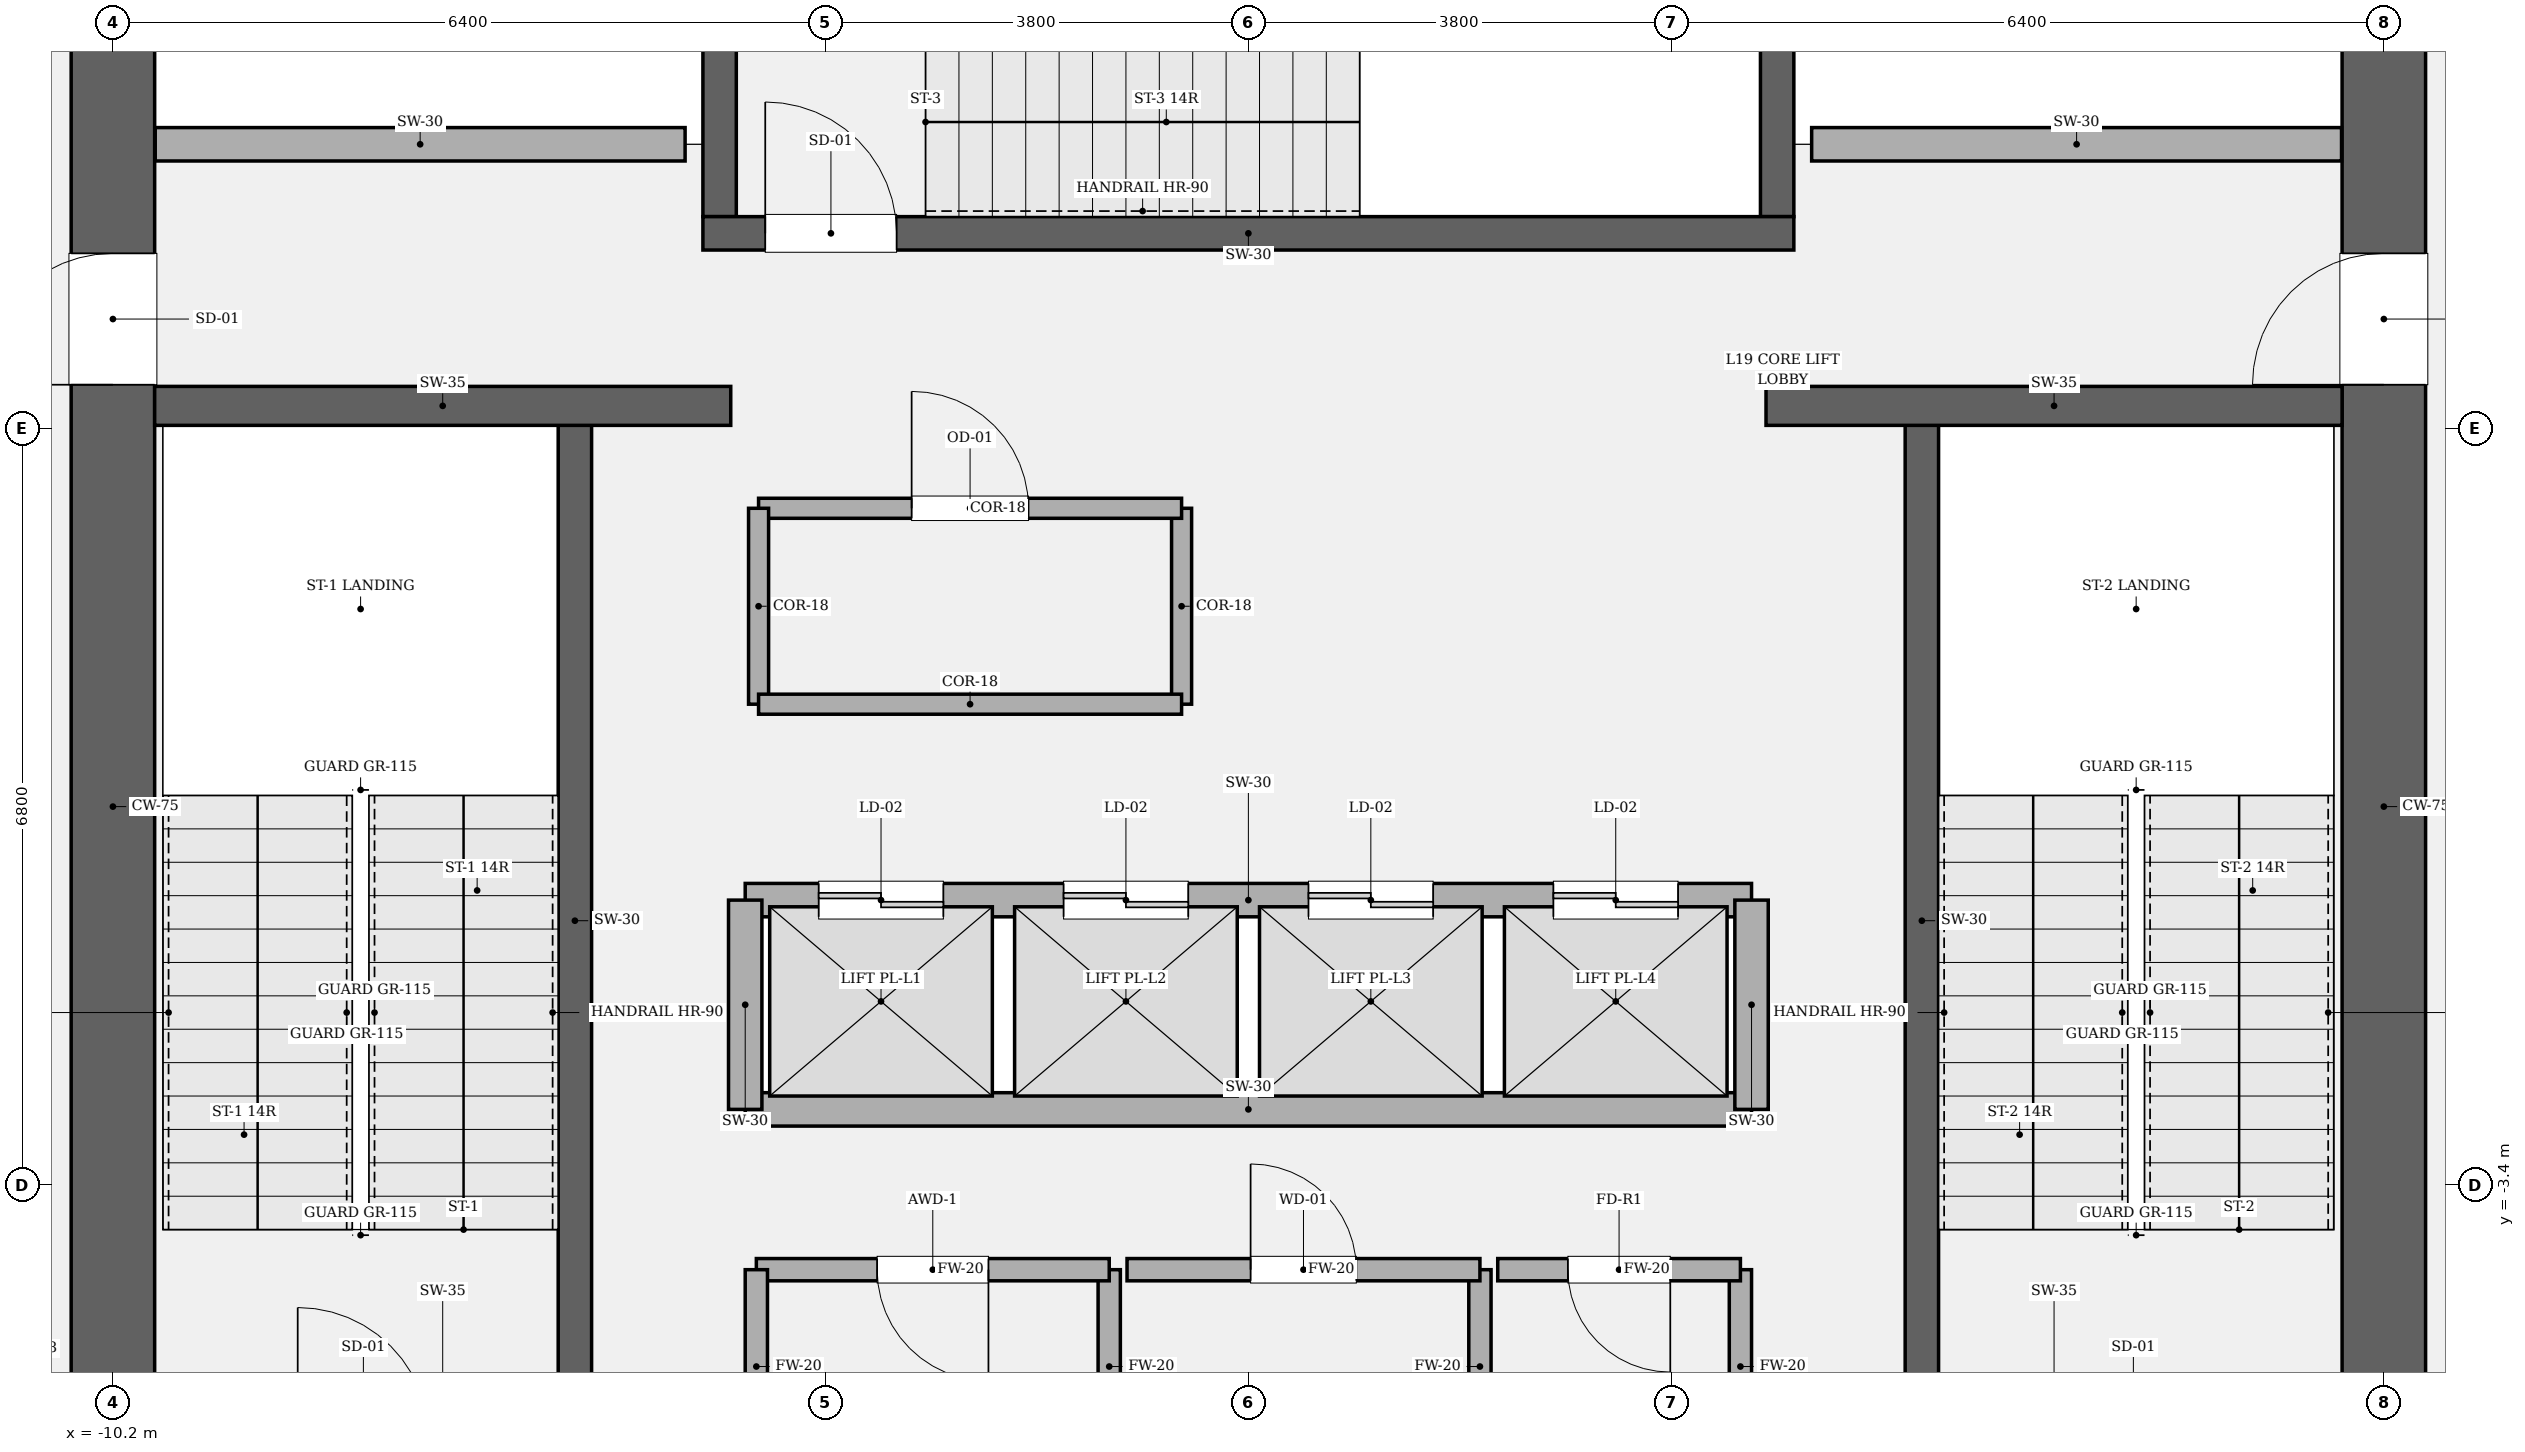
"""IFC4 building model, lengths in metres.
Left out: names, types, materials, properties, quantities, classifications, styles, units other than length and angle.
Written with IfcOpenShell. Run it as: python <this file> out.ifc"""

import sys

from ifc_helpers import new_model, si_unit, direction, frame, frame_2d, origin, place, context, subcontext, project, spatial, rectangle, extrude, element, fill, save


model = new_model("IFC4")
c1 = context("Model", 3, precision=1e-05, world=origin(), true_north=direction((0.0, 1.0)))
c2 = subcontext(c1, "Body", "Model", "MODEL_VIEW")
j1 = project(units=[si_unit("LENGTHUNIT", "METRE"), si_unit("PLANEANGLEUNIT", "RADIAN")], contexts=[c1])
p1 = place(None, origin())
s1 = spatial("IfcSite", under=j1, at=p1, CompositionType="ELEMENT")
p2 = place(p1, origin())
s2 = spatial("IfcBuilding", under=s1, at=p2, CompositionType="ELEMENT")
p3 = place(p2, frame((0.0, 0.0, 84.9)))
s3 = spatial("IfcBuildingStorey", under=s2, at=p3, CompositionType="ELEMENT", Elevation=84.9)
p4 = place(p3, frame((-10.2, -8.825, 0.0), z_axis=(0.0, 0.0, 1.0), x_axis=(0.0, 1.0, 0.0)))
e1 = element("IfcWall", 1, at=p4, inside=s3, PredefinedType="SHEAR", context=c2, shape_type="SweptSolid", body=[
    extrude(rectangle(XDim=17.65, YDim=0.75, at=frame_2d((8.825, 0.0))), origin(), (0.0, 0.0, 1.0), 4.05),
])
p5 = place(p4, frame((12.615, 0.0, 0.0)))
e2 = element("IfcOpeningElement", 2, at=p5, cuts=e1, PredefinedType="OPENING", context=c2, shape_type="SweptSolid", body=[
    extrude(rectangle(XDim=1.18, YDim=2.2, at=frame_2d((0.59, 1.1))), frame((0.0, 0.385, 0.0), z_axis=(0.0, -1.0, 0.0), x_axis=(1.0, 0.0, 0.0)), (0.0, 0.0, 1.0), 0.77),
])
p6 = place(p3, frame((10.2, 8.825, 0.0), z_axis=(0.0, 0.0, 1.0), x_axis=(0.0, -1.0, 0.0)))
e3 = element("IfcWall", 3, at=p6, inside=s3, PredefinedType="SHEAR", context=c2, shape_type="SweptSolid", body=[
    extrude(rectangle(XDim=17.65, YDim=0.75, at=frame_2d((8.825, 0.0))), origin(), (0.0, 0.0, 1.0), 4.05),
])
p7 = place(p6, frame((3.855, 0.0, 0.0)))
e4 = element("IfcOpeningElement", 4, at=p7, cuts=e3, PredefinedType="OPENING", context=c2, shape_type="SweptSolid", body=[
    extrude(rectangle(XDim=1.18, YDim=2.2, at=frame_2d((0.59, 1.1))), frame((0.0, 0.385, 0.0), z_axis=(0.0, -1.0, 0.0), x_axis=(1.0, 0.0, 0.0)), (0.0, 0.0, 1.0), 0.77),
])
for number, where, z_axis, x_axis in (
    (5, (-6.05, -5.5, 0.0), (0.0, 0.0, 1.0), (0.0, 1.0, 0.0)),
    (6, (6.05, 3.45, 0.0), (0.0, 0.0, 1.0), (0.0, -1.0, 0.0)),
):
    element("IfcWall", number, at=place(p3, frame(where, z_axis=z_axis, x_axis=x_axis)), inside=s3, PredefinedType="SOLIDWALL", context=c2, shape_type="SweptSolid", body=[
        extrude(rectangle(XDim=8.95, YDim=0.3, at=frame_2d((4.475, 0.0))), origin(), (0.0, 0.0, 1.0), 4.05),
    ])
for number, where, z_axis, x_axis in (
    (7, (-4.75, 5.3, 0.0), (0.0, 0.0, 1.0), (0.0, 1.0, 0.0)),
    (8, (4.75, 8.825, 0.0), (0.0, 0.0, 1.0), (0.0, -1.0, 0.0)),
):
    element("IfcWall", number, at=place(p3, frame(where, z_axis=z_axis, x_axis=x_axis)), inside=s3, PredefinedType="SOLIDWALL", context=c2, shape_type="SweptSolid", body=[
        extrude(rectangle(XDim=3.525, YDim=0.3, at=frame_2d((1.762, 0.0))), origin(), (0.0, 0.0, 1.0), 4.05),
    ])
p8 = place(p3, frame((-4.9, 5.15, 0.0), z_axis=(0.0, 0.0, 1.0), x_axis=(1.0, 0.0, 0.0)))
e9 = element("IfcWall", 9, at=p8, inside=s3, PredefinedType="SOLIDWALL", context=c2, shape_type="SweptSolid", body=[
    extrude(rectangle(XDim=9.8, YDim=0.3, at=frame_2d((4.9, 0.0))), origin(), (0.0, 0.0, 1.0), 4.05),
])
p9 = place(p8, frame((0.56, 0.0, 0.0)))
e10 = element("IfcOpeningElement", 10, at=p9, cuts=e9, PredefinedType="OPENING", context=c2, shape_type="SweptSolid", body=[
    extrude(rectangle(XDim=1.18, YDim=2.2, at=frame_2d((0.59, 1.1))), frame((0.0, 0.16, 0.0), z_axis=(0.0, -1.0, 0.0), x_axis=(1.0, 0.0, 0.0)), (0.0, 0.0, 1.0), 0.32),
])
for number, where, z_axis, x_axis in (
    (11, (-9.825, 3.6, 0.0), (0.0, 0.0, 1.0), (1.0, 0.0, 0.0)),
    (12, (4.65, 3.6, 0.0), (0.0, 0.0, 1.0), (1.0, 0.0, 0.0)),
):
    element("IfcWall", number, at=place(p3, frame(where, z_axis=z_axis, x_axis=x_axis)), inside=s3, PredefinedType="SOLIDWALL", context=c2, shape_type="SweptSolid", body=[
        extrude(rectangle(XDim=5.175, YDim=0.35, at=frame_2d((2.587, 0.0))), origin(), (0.0, 0.0, 1.0), 4.05),
    ])
p10 = place(p3, frame((-4.52, -0.84, 0.0), z_axis=(0.0, 0.0, 1.0), x_axis=(1.0, 0.0, 0.0)))
e13 = element("IfcWall", 13, at=p10, inside=s3, PredefinedType="SOLIDWALL", context=c2, shape_type="SweptSolid", body=[
    extrude(rectangle(XDim=9.04, YDim=0.3, at=frame_2d((4.52, 0.0))), origin(), (0.0, 0.0, 1.0), 3.81),
])
p11 = place(p10, frame((0.66, 0.0, 0.0)))
e14 = element("IfcOpeningElement", 14, at=p11, cuts=e13, PredefinedType="OPENING", context=c2, shape_type="SweptSolid", body=[
    extrude(rectangle(XDim=1.12, YDim=2.25, at=frame_2d((0.56, 1.125))), frame((0.0, 0.16, 0.0), z_axis=(0.0, -1.0, 0.0), x_axis=(1.0, 0.0, 0.0)), (0.0, 0.0, 1.0), 0.32),
])
p12 = place(p10, frame((2.86, 0.0, 0.0)))
e15 = element("IfcOpeningElement", 15, at=p12, cuts=e13, PredefinedType="OPENING", context=c2, shape_type="SweptSolid", body=[
    extrude(rectangle(XDim=1.12, YDim=2.25, at=frame_2d((0.56, 1.125))), frame((0.0, 0.16, 0.0), z_axis=(0.0, -1.0, 0.0), x_axis=(1.0, 0.0, 0.0)), (0.0, 0.0, 1.0), 0.32),
])
p13 = place(p10, frame((5.06, 0.0, 0.0)))
e16 = element("IfcOpeningElement", 16, at=p13, cuts=e13, PredefinedType="OPENING", context=c2, shape_type="SweptSolid", body=[
    extrude(rectangle(XDim=1.12, YDim=2.25, at=frame_2d((0.56, 1.125))), frame((0.0, 0.16, 0.0), z_axis=(0.0, -1.0, 0.0), x_axis=(1.0, 0.0, 0.0)), (0.0, 0.0, 1.0), 0.32),
])
p14 = place(p10, frame((7.26, 0.0, 0.0)))
e17 = element("IfcOpeningElement", 17, at=p14, cuts=e13, PredefinedType="OPENING", context=c2, shape_type="SweptSolid", body=[
    extrude(rectangle(XDim=1.12, YDim=2.25, at=frame_2d((0.56, 1.125))), frame((0.0, 0.16, 0.0), z_axis=(0.0, -1.0, 0.0), x_axis=(1.0, 0.0, 0.0)), (0.0, 0.0, 1.0), 0.32),
])
p15 = place(p3, frame((-4.52, -2.72, 0.0), z_axis=(0.0, 0.0, 1.0), x_axis=(1.0, 0.0, 0.0)))
e18 = element("IfcWall", 18, at=p15, inside=s3, PredefinedType="SOLIDWALL", context=c2, shape_type="SweptSolid", body=[
    extrude(rectangle(XDim=9.04, YDim=0.3, at=frame_2d((4.52, 0.0))), origin(), (0.0, 0.0, 1.0), 3.81),
])
for number, where, z_axis, x_axis in (
    (19, (-4.52, -2.72, 0.0), (0.0, 0.0, 1.0), (0.0, 1.0, 0.0)),
    (20, (4.52, -2.72, 0.0), (0.0, 0.0, 1.0), (0.0, 1.0, 0.0)),
):
    element("IfcWall", number, at=place(p3, frame(where, z_axis=z_axis, x_axis=x_axis)), inside=s3, PredefinedType="SOLIDWALL", context=c2, shape_type="SweptSolid", body=[
        extrude(rectangle(XDim=1.88, YDim=0.3, at=frame_2d((0.94, 0.0))), origin(), (0.0, 0.0, 1.0), 3.81),
    ])
for number, where, z_axis, x_axis in (
    (21, (-9.82, 5.95, 0.0), (0.0, 0.0, 1.0), (1.0, 0.0, 0.0)),
    (22, (5.06, 5.95, 0.0), (0.0, 0.0, 1.0), (1.0, 0.0, 0.0)),
):
    element("IfcWall", number, at=place(p3, frame(where, z_axis=z_axis, x_axis=x_axis)), inside=s3, PredefinedType="SOLIDWALL", context=c2, shape_type="SweptSolid", body=[
        extrude(rectangle(XDim=4.76, YDim=0.3, at=frame_2d((2.38, 0.0))), origin(), (0.0, 0.0, 1.0), 3.81),
    ])
p16 = place(p3, frame((-1.25, -5.9, 0.0), z_axis=(0.0, 0.0, 1.0), x_axis=(0.0, 1.0, 0.0)))
e23 = element("IfcWall", 23, at=p16, inside=s3, PredefinedType="SOLIDWALL", context=c2, shape_type="SweptSolid", body=[
    extrude(rectangle(XDim=1.74, YDim=0.2, at=frame_2d((0.87, 0.0))), origin(), (0.0, 0.0, 1.0), 3.81),
])
p17 = place(p3, frame((-1.25, -4.16, 0.0), z_axis=(0.0, 0.0, 1.0), x_axis=(-1.0, 0.0, 0.0)))
e24 = element("IfcWall", 24, at=p17, inside=s3, PredefinedType="SOLIDWALL", context=c2, shape_type="SweptSolid", body=[
    extrude(rectangle(XDim=3.17, YDim=0.2, at=frame_2d((1.585, 0.0))), origin(), (0.0, 0.0, 1.0), 3.81),
])
p18 = place(p17, frame((1.085, 0.0, 0.0)))
e25 = element("IfcOpeningElement", 25, at=p18, cuts=e24, PredefinedType="OPENING", context=c2, shape_type="SweptSolid", body=[
    extrude(rectangle(XDim=1.0, YDim=2.15, at=frame_2d((0.5, 1.075))), frame((0.0, 0.11, 0.0), z_axis=(0.0, -1.0, 0.0), x_axis=(1.0, 0.0, 0.0)), (0.0, 0.0, 1.0), 0.22),
])
for number, where, z_axis, x_axis in (
    (26, (-4.42, -4.16, 0.0), (0.0, 0.0, 1.0), (0.0, -1.0, 0.0)),
    (27, (2.08, -5.9, 0.0), (0.0, 0.0, 1.0), (0.0, 1.0, 0.0)),
):
    element("IfcWall", number, at=place(p3, frame(where, z_axis=z_axis, x_axis=x_axis)), inside=s3, PredefinedType="SOLIDWALL", context=c2, shape_type="SweptSolid", body=[
        extrude(rectangle(XDim=1.74, YDim=0.2, at=frame_2d((0.87, 0.0))), origin(), (0.0, 0.0, 1.0), 3.81),
    ])
p19 = place(p3, frame((2.08, -4.16, 0.0), z_axis=(0.0, 0.0, 1.0), x_axis=(-1.0, 0.0, 0.0)))
e28 = element("IfcWall", 28, at=p19, inside=s3, PredefinedType="SOLIDWALL", context=c2, shape_type="SweptSolid", body=[
    extrude(rectangle(XDim=3.17, YDim=0.2, at=frame_2d((1.585, 0.0))), origin(), (0.0, 0.0, 1.0), 3.81),
])
p20 = place(p19, frame((1.11, 0.0, 0.0)))
e29 = element("IfcOpeningElement", 29, at=p20, cuts=e28, PredefinedType="OPENING", context=c2, shape_type="SweptSolid", body=[
    extrude(rectangle(XDim=0.95, YDim=2.15, at=frame_2d((0.475, 1.075))), frame((0.0, 0.11, 0.0), z_axis=(0.0, -1.0, 0.0), x_axis=(1.0, 0.0, 0.0)), (0.0, 0.0, 1.0), 0.22),
])
p21 = place(p3, frame((4.42, -5.9, 0.0), z_axis=(0.0, 0.0, 1.0), x_axis=(0.0, 1.0, 0.0)))
e30 = element("IfcWall", 30, at=p21, inside=s3, PredefinedType="SOLIDWALL", context=c2, shape_type="SweptSolid", body=[
    extrude(rectangle(XDim=1.74, YDim=0.2, at=frame_2d((0.87, 0.0))), origin(), (0.0, 0.0, 1.0), 3.81),
])
p22 = place(p3, frame((4.42, -4.16, 0.0), z_axis=(0.0, 0.0, 1.0), x_axis=(-1.0, 0.0, 0.0)))
e31 = element("IfcWall", 31, at=p22, inside=s3, PredefinedType="SOLIDWALL", context=c2, shape_type="SweptSolid", body=[
    extrude(rectangle(XDim=2.18, YDim=0.2, at=frame_2d((1.09, 0.0))), origin(), (0.0, 0.0, 1.0), 3.81),
])
p23 = place(p22, frame((0.63, 0.0, 0.0)))
e32 = element("IfcOpeningElement", 32, at=p23, cuts=e31, PredefinedType="OPENING", context=c2, shape_type="SweptSolid", body=[
    extrude(rectangle(XDim=0.92, YDim=2.1, at=frame_2d((0.46, 1.05))), frame((0.0, 0.11, 0.0), z_axis=(0.0, -1.0, 0.0), x_axis=(1.0, 0.0, 0.0)), (0.0, 0.0, 1.0), 0.22),
])
p24 = place(p3, frame((-0.6, 0.92, 0.0), z_axis=(0.0, 0.0, 1.0), x_axis=(0.0, 1.0, 0.0)))
e33 = element("IfcWall", 33, at=p24, inside=s3, PredefinedType="PARTITIONING", context=c2, shape_type="SweptSolid", body=[
    extrude(rectangle(XDim=1.76, YDim=0.18, at=frame_2d((0.88, 0.0))), origin(), (0.0, 0.0, 1.0), 3.81),
])
p25 = place(p3, frame((-0.6, 2.68, 0.0), z_axis=(0.0, 0.0, 1.0), x_axis=(-1.0, 0.0, 0.0)))
e34 = element("IfcWall", 34, at=p25, inside=s3, PredefinedType="PARTITIONING", context=c2, shape_type="SweptSolid", body=[
    extrude(rectangle(XDim=3.8, YDim=0.18, at=frame_2d((1.9, 0.0))), origin(), (0.0, 0.0, 1.0), 3.81),
])
p26 = place(p25, frame((1.375, 0.0, 0.0)))
e35 = element("IfcOpeningElement", 35, at=p26, cuts=e34, PredefinedType="OPENING", context=c2, shape_type="SweptSolid", body=[
    extrude(rectangle(XDim=1.05, YDim=2.2, at=frame_2d((0.525, 1.1))), frame((0.0, 0.1, 0.0), z_axis=(0.0, -1.0, 0.0), x_axis=(1.0, 0.0, 0.0)), (0.0, 0.0, 1.0), 0.2),
])
p27 = place(p3, frame((-4.4, 2.68, 0.0), z_axis=(0.0, 0.0, 1.0), x_axis=(0.0, -1.0, 0.0)))
e36 = element("IfcWall", 36, at=p27, inside=s3, PredefinedType="PARTITIONING", context=c2, shape_type="SweptSolid", body=[
    extrude(rectangle(XDim=1.76, YDim=0.18, at=frame_2d((0.88, 0.0))), origin(), (0.0, 0.0, 1.0), 3.81),
])
p28 = place(p3, frame((-4.4, 0.92, 0.0), z_axis=(0.0, 0.0, 1.0), x_axis=(1.0, 0.0, 0.0)))
e37 = element("IfcWall", 37, at=p28, inside=s3, PredefinedType="PARTITIONING", context=c2, shape_type="SweptSolid", body=[
    extrude(rectangle(XDim=3.8, YDim=0.18, at=frame_2d((1.9, 0.0))), origin(), (0.0, 0.0, 1.0), 3.81),
])
p29 = place(p9, origin())
e38 = element("IfcDoor", 38, at=p29, inside=s3, OperationType="SINGLE_SWING_LEFT", PredefinedType="DOOR", context=c2, shape_type="SweptSolid", body=[
    extrude(rectangle(XDim=1.18, YDim=2.2, at=frame_2d((0.59, 1.1))), frame((0.0, 0.025, 0.0), z_axis=(0.0, -1.0, 0.0), x_axis=(1.0, 0.0, 0.0)), (0.0, 0.0, 1.0), 0.05),
])
fill(e10, e38)
p30 = place(p5, origin())
e39 = element("IfcDoor", 39, at=p30, inside=s3, OperationType="SINGLE_SWING_LEFT", PredefinedType="DOOR", context=c2, shape_type="SweptSolid", body=[
    extrude(rectangle(XDim=1.18, YDim=2.2, at=frame_2d((0.59, 1.1))), frame((0.0, 0.025, 0.0), z_axis=(0.0, -1.0, 0.0), x_axis=(1.0, 0.0, 0.0)), (0.0, 0.0, 1.0), 0.05),
])
fill(e2, e39)
p31 = place(p7, origin())
e40 = element("IfcDoor", 40, at=p31, inside=s3, OperationType="SINGLE_SWING_RIGHT", PredefinedType="DOOR", context=c2, shape_type="SweptSolid", body=[
    extrude(rectangle(XDim=1.18, YDim=2.2, at=frame_2d((0.59, 1.1))), frame((0.0, 0.025, 0.0), z_axis=(0.0, -1.0, 0.0), x_axis=(1.0, 0.0, 0.0)), (0.0, 0.0, 1.0), 0.05),
])
fill(e4, e40)
p32 = place(p11, origin())
e41 = element("IfcDoor", 41, at=p32, inside=s3, OperationType="DOUBLE_DOOR_SLIDING", PredefinedType="DOOR", context=c2, shape_type="SweptSolid", body=[
    extrude(rectangle(XDim=1.12, YDim=2.25, at=frame_2d((0.56, 1.125))), frame((0.0, 0.025, 0.0), z_axis=(0.0, -1.0, 0.0), x_axis=(1.0, 0.0, 0.0)), (0.0, 0.0, 1.0), 0.05),
])
fill(e14, e41)
p33 = place(p12, origin())
e42 = element("IfcDoor", 42, at=p33, inside=s3, OperationType="DOUBLE_DOOR_SLIDING", PredefinedType="DOOR", context=c2, shape_type="SweptSolid", body=[
    extrude(rectangle(XDim=1.12, YDim=2.25, at=frame_2d((0.56, 1.125))), frame((0.0, 0.025, 0.0), z_axis=(0.0, -1.0, 0.0), x_axis=(1.0, 0.0, 0.0)), (0.0, 0.0, 1.0), 0.05),
])
fill(e15, e42)
p34 = place(p13, origin())
e43 = element("IfcDoor", 43, at=p34, inside=s3, OperationType="DOUBLE_DOOR_SLIDING", PredefinedType="DOOR", context=c2, shape_type="SweptSolid", body=[
    extrude(rectangle(XDim=1.12, YDim=2.25, at=frame_2d((0.56, 1.125))), frame((0.0, 0.025, 0.0), z_axis=(0.0, -1.0, 0.0), x_axis=(1.0, 0.0, 0.0)), (0.0, 0.0, 1.0), 0.05),
])
fill(e16, e43)
p35 = place(p14, origin())
e44 = element("IfcDoor", 44, at=p35, inside=s3, OperationType="DOUBLE_DOOR_SLIDING", PredefinedType="DOOR", context=c2, shape_type="SweptSolid", body=[
    extrude(rectangle(XDim=1.12, YDim=2.25, at=frame_2d((0.56, 1.125))), frame((0.0, 0.025, 0.0), z_axis=(0.0, -1.0, 0.0), x_axis=(1.0, 0.0, 0.0)), (0.0, 0.0, 1.0), 0.05),
])
fill(e17, e44)
p36 = place(p18, origin())
e45 = element("IfcDoor", 45, at=p36, inside=s3, OperationType="SINGLE_SWING_LEFT", PredefinedType="DOOR", context=c2, shape_type="SweptSolid", body=[
    extrude(rectangle(XDim=1.0, YDim=2.15, at=frame_2d((0.5, 1.075))), frame((0.0, 0.025, 0.0), z_axis=(0.0, -1.0, 0.0), x_axis=(1.0, 0.0, 0.0)), (0.0, 0.0, 1.0), 0.05),
])
fill(e25, e45)
p37 = place(p20, origin())
e46 = element("IfcDoor", 46, at=p37, inside=s3, OperationType="SINGLE_SWING_RIGHT", PredefinedType="DOOR", context=c2, shape_type="SweptSolid", body=[
    extrude(rectangle(XDim=0.95, YDim=2.15, at=frame_2d((0.475, 1.075))), frame((0.0, 0.025, 0.0), z_axis=(0.0, -1.0, 0.0), x_axis=(1.0, 0.0, 0.0)), (0.0, 0.0, 1.0), 0.05),
])
fill(e29, e46)
p38 = place(p23, origin())
e47 = element("IfcDoor", 47, at=p38, inside=s3, OperationType="SINGLE_SWING_LEFT", PredefinedType="DOOR", context=c2, shape_type="SweptSolid", body=[
    extrude(rectangle(XDim=0.92, YDim=2.1, at=frame_2d((0.46, 1.05))), frame((0.0, 0.025, 0.0), z_axis=(0.0, -1.0, 0.0), x_axis=(1.0, 0.0, 0.0)), (0.0, 0.0, 1.0), 0.05),
])
fill(e32, e47)
p39 = place(p26, origin())
e48 = element("IfcDoor", 48, at=p39, inside=s3, OperationType="SINGLE_SWING_RIGHT", PredefinedType="DOOR", context=c2, shape_type="SweptSolid", body=[
    extrude(rectangle(XDim=1.05, YDim=2.2, at=frame_2d((0.525, 1.1))), frame((0.0, 0.025, 0.0), z_axis=(0.0, -1.0, 0.0), x_axis=(1.0, 0.0, 0.0)), (0.0, 0.0, 1.0), 0.05),
])
fill(e35, e48)
save(model, sys.argv[1])
